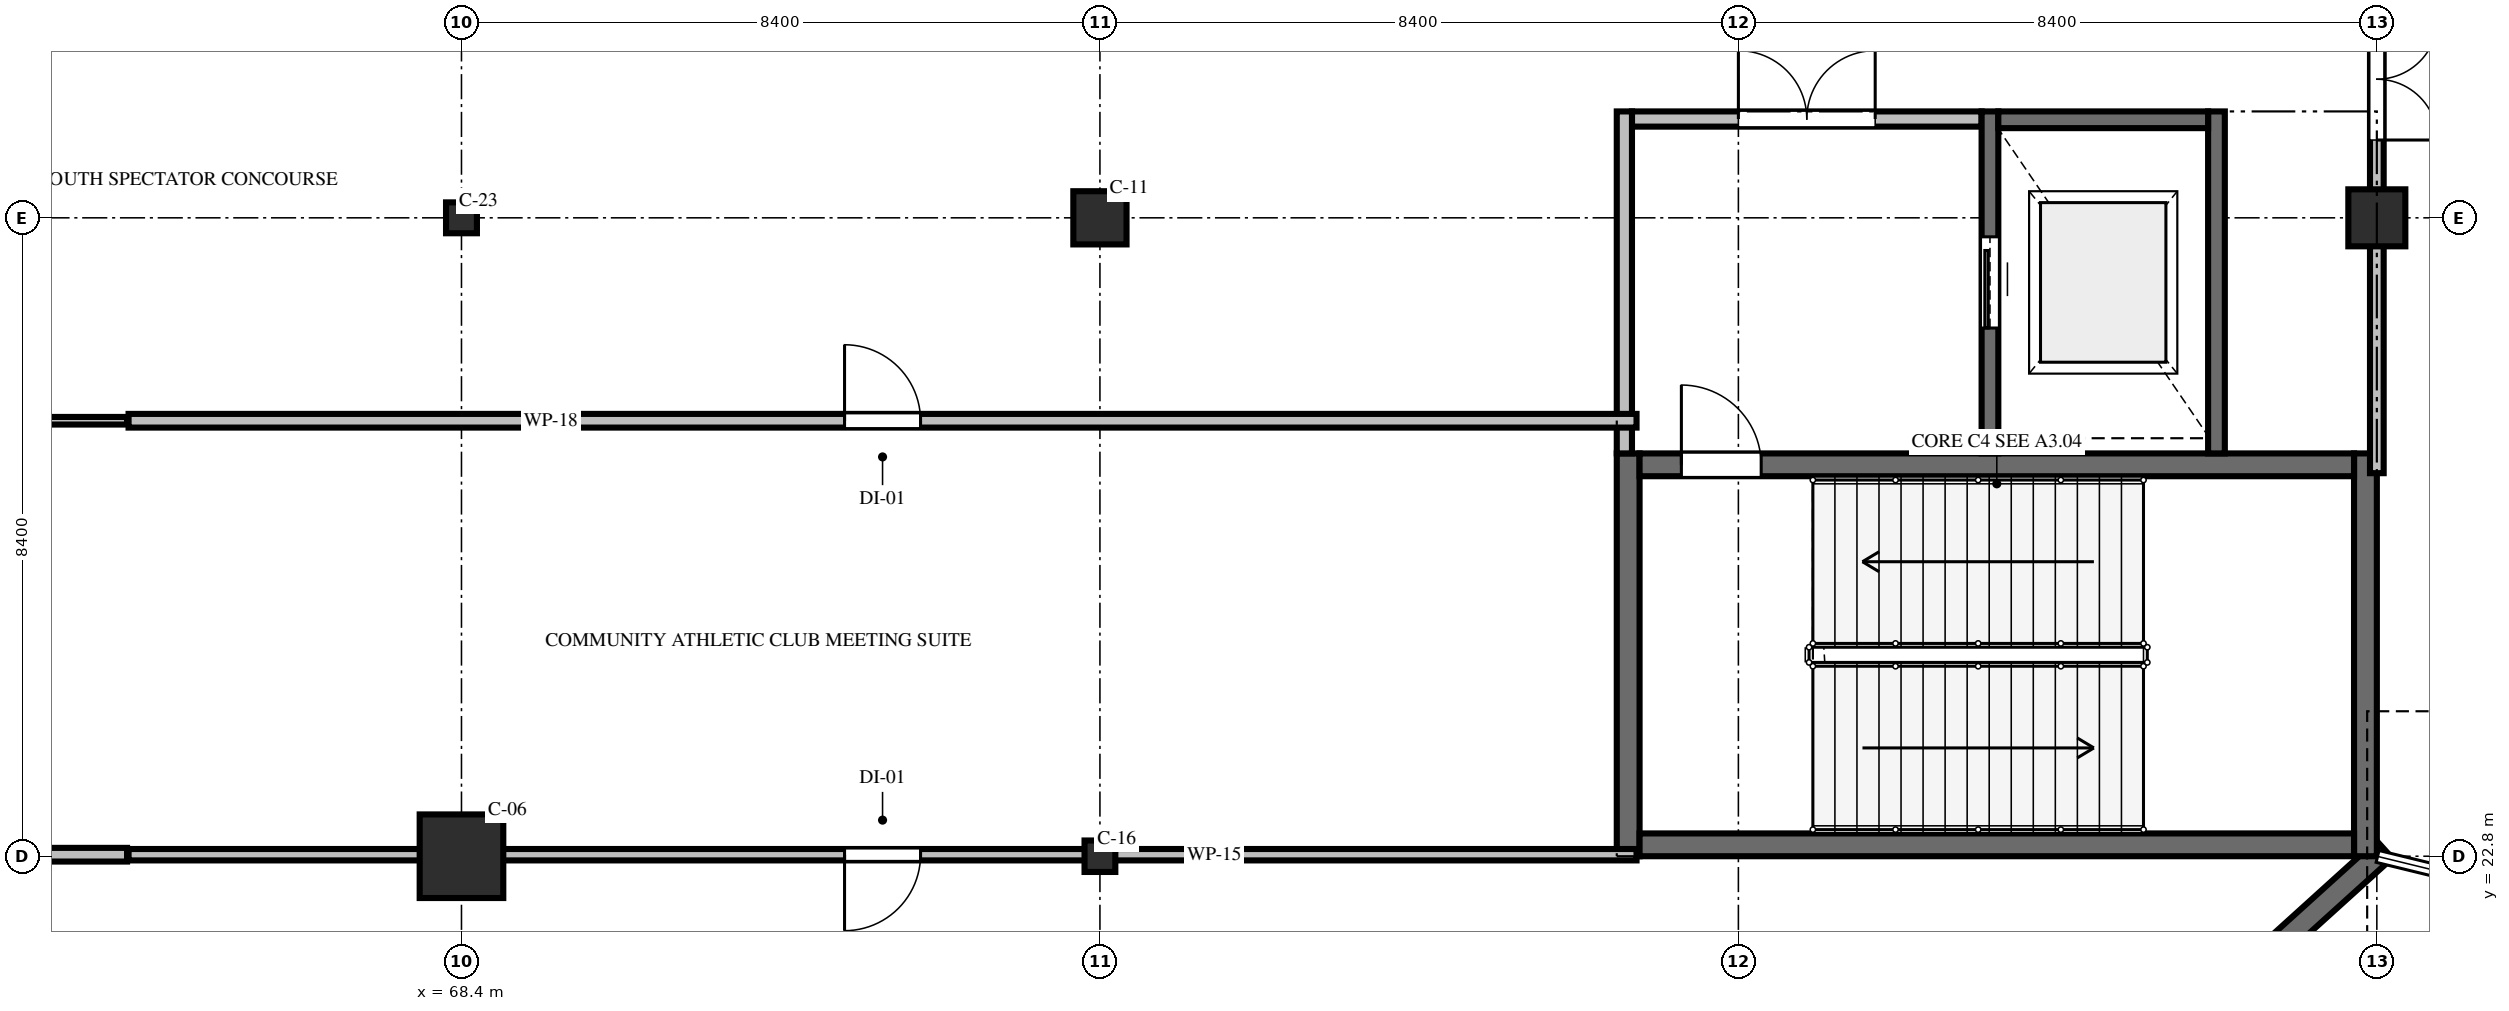
"""IFC4 building model, lengths in metres.
Left out: names, types, materials, properties, quantities, classifications, styles, units other than length and angle.
Written with IfcOpenShell. Run it as: python <this file> out.ifc"""

import sys

from ifc_helpers import new_model, si_unit, direction, frame, frame_2d, origin, origin_2d, place, context, subcontext, project, spatial, rectangle, circle, hollow_circle, i_section, extrude, element, fill, save


model = new_model("IFC4")
c1 = context("Model", 3, precision=1e-05, world=origin(), true_north=direction((0.0, 1.0)))
c2 = subcontext(c1, "Body", "Model", "MODEL_VIEW")
j1 = project(units=[si_unit("LENGTHUNIT", "METRE"), si_unit("PLANEANGLEUNIT", "RADIAN")], contexts=[c1])
p1 = place(None, origin())
s1 = spatial("IfcSite", under=j1, at=p1, CompositionType="ELEMENT")
p2 = place(p1, origin())
s2 = spatial("IfcBuilding", under=s1, at=p2, CompositionType="ELEMENT")
p3 = place(p2, frame((0.0, 0.0, 5.4)))
s3 = spatial("IfcBuildingStorey", under=s2, at=p3, CompositionType="ELEMENT", Elevation=5.4)
p4 = place(p3, frame((68.4, 22.8, 0.0), z_axis=(0.0, 0.0, 1.0), x_axis=(1.0, 0.0, 0.0)))
e1 = element("IfcColumn", 1, at=p4, inside=s3, PredefinedType="COLUMN", context=c2, shape_type="SweptSolid", body=[
    extrude(rectangle(XDim=1.1, YDim=1.1, at=origin_2d()), origin(), (0.0, 0.0, 1.0), 5.4),
])
p5 = place(p3, frame((68.4, 31.2, 0.0), z_axis=(0.0, 0.0, 1.0), x_axis=(1.0, 0.0, 0.0)))
e2 = element("IfcColumn", 2, at=p5, inside=s3, PredefinedType="COLUMN", context=c2, shape_type="SweptSolid", body=[
    extrude(hollow_circle(Radius=0.203, WallThickness=0.016, at=origin_2d()), origin(), (0.0, 0.0, 1.0), 5.4),
])
p6 = place(p3, frame((76.8, 22.8, 0.0), z_axis=(0.0, 0.0, 1.0), x_axis=(1.0, 0.0, 0.0)))
e3 = element("IfcColumn", 3, at=p6, inside=s3, PredefinedType="COLUMN", context=c2, shape_type="SweptSolid", body=[
    extrude(i_section(OverallWidth=0.405, OverallDepth=0.414, WebThickness=0.018, FlangeThickness=0.028, FilletRadius=0.022, at=origin_2d()), origin(), (0.0, 0.0, 1.0), 5.4),
])
p7 = place(p3, frame((76.8, 31.2, 0.0), z_axis=(0.0, 0.0, 1.0), x_axis=(1.0, 0.0, 0.0)))
e4 = element("IfcColumn", 4, at=p7, inside=s3, PredefinedType="COLUMN", context=c2, shape_type="SweptSolid", body=[
    extrude(circle(Radius=0.35, at=origin_2d()), origin(), (0.0, 0.0, 1.0), 5.4),
])
p8 = place(p3, frame((93.6, 31.2, 0.0), z_axis=(0.0, 0.0, 1.0), x_axis=(1.0, 0.0, 0.0)))
e5 = element("IfcColumn", 5, at=p8, inside=s3, PredefinedType="COLUMN", context=c2, shape_type="SweptSolid", body=[
    extrude(rectangle(XDim=0.75, YDim=0.75, at=origin_2d()), origin(), (0.0, 0.0, 1.0), 5.4),
])
p9 = place(p3, frame((93.699, 22.89, 0.0), z_axis=(0.0, 0.0, 1.0), x_axis=(-0.741513407769, -0.670938049375, 0.0)))
e6 = element("IfcWall", 6, at=p9, inside=s3, PredefinedType="SOLIDWALL", context=c2, shape_type="SweptSolid", body=[
    extrude(rectangle(XDim=5.947, YDim=0.31, at=frame_2d((2.973, 0.0))), origin(), (0.0, 0.0, 1.0), 5.09),
])
p10 = place(p9, frame((2.58, 0.0, 0.9)))
e7 = element("IfcOpeningElement", 7, at=p10, cuts=e6, PredefinedType="OPENING", context=c2, shape_type="SweptSolid", body=[
    extrude(rectangle(XDim=1.5, YDim=1.6, at=frame_2d((0.75, 0.8))), frame((0.0, 0.165, 0.0), z_axis=(0.0, -1.0, 0.0), x_axis=(1.0, 0.0, 0.0)), (0.0, 0.0, 1.0), 0.33),
])
for number, where, z_axis, x_axis in (
    (8, (83.75, 22.8, 0.0), (0.0, 0.0, 1.0), (0.0, 1.0, 0.0)),
    (9, (93.45, 28.1, 0.0), (0.0, 0.0, 1.0), (0.0, -1.0, 0.0)),
):
    element("IfcWall", number, at=place(p3, frame(where, z_axis=z_axis, x_axis=x_axis)), inside=s3, PredefinedType="SHEAR", context=c2, shape_type="SweptSolid", body=[
        extrude(rectangle(XDim=5.3, YDim=0.3, at=frame_2d((2.65, 0.0))), origin(), (0.0, 0.0, 1.0), 4.98),
    ])
p11 = place(p3, frame((93.3, 22.95, 0.0), z_axis=(0.0, 0.0, 1.0), x_axis=(-1.0, 0.0, 0.0)))
e10 = element("IfcWall", 10, at=p11, inside=s3, PredefinedType="SHEAR", context=c2, shape_type="SweptSolid", body=[
    extrude(rectangle(XDim=9.4, YDim=0.3, at=frame_2d((4.7, 0.0))), origin(), (0.0, 0.0, 1.0), 4.98),
])
p12 = place(p3, frame((83.9, 27.95, 0.0), z_axis=(0.0, 0.0, 1.0), x_axis=(1.0, 0.0, 0.0)))
e11 = element("IfcWall", 11, at=p12, inside=s3, PredefinedType="SHEAR", context=c2, shape_type="SweptSolid", body=[
    extrude(rectangle(XDim=9.4, YDim=0.3, at=frame_2d((4.7, 0.0))), origin(), (0.0, 0.0, 1.0), 4.98),
])
p13 = place(p12, frame((0.55, 0.0, 0.0)))
e12 = element("IfcOpeningElement", 12, at=p13, cuts=e11, PredefinedType="OPENING", context=c2, shape_type="SweptSolid", body=[
    extrude(rectangle(XDim=1.05, YDim=2.2, at=frame_2d((0.525, 1.1))), frame((0.0, 0.16, 0.0), z_axis=(0.0, -1.0, 0.0), x_axis=(1.0, 0.0, 0.0)), (0.0, 0.0, 1.0), 0.32),
])
p14 = place(p3, frame((83.8, 32.5, 0.0), z_axis=(0.0, 0.0, 1.0), x_axis=(1.0, 0.0, 0.0)))
e13 = element("IfcWall", 13, at=p14, inside=s3, PredefinedType="SOLIDWALL", context=c2, shape_type="SweptSolid", body=[
    extrude(rectangle(XDim=4.6, YDim=0.2, at=frame_2d((2.3, 0.0))), origin(), (0.0, 0.0, 1.0), 4.98),
])
p15 = place(p14, frame((1.4, 0.0, 0.0)))
e14 = element("IfcOpeningElement", 14, at=p15, cuts=e13, PredefinedType="OPENING", context=c2, shape_type="SweptSolid", body=[
    extrude(rectangle(XDim=1.8, YDim=2.2, at=frame_2d((0.9, 1.1))), frame((0.0, 0.11, 0.0), z_axis=(0.0, -1.0, 0.0), x_axis=(1.0, 0.0, 0.0)), (0.0, 0.0, 1.0), 0.22),
])
p16 = place(p3, frame((83.7, 28.1, 0.0), z_axis=(0.0, 0.0, 1.0), x_axis=(0.0, 1.0, 0.0)))
e15 = element("IfcWall", 15, at=p16, inside=s3, PredefinedType="SOLIDWALL", context=c2, shape_type="SweptSolid", body=[
    extrude(rectangle(XDim=4.5, YDim=0.2, at=frame_2d((2.25, 0.0))), origin(), (0.0, 0.0, 1.0), 4.98),
])
p17 = place(p3, frame((88.51, 28.1, 0.0), z_axis=(0.0, 0.0, 1.0), x_axis=(0.0, 1.0, 0.0)))
e16 = element("IfcWall", 16, at=p17, inside=s3, PredefinedType="SOLIDWALL", context=c2, shape_type="SweptSolid", body=[
    extrude(rectangle(XDim=4.5, YDim=0.22, at=frame_2d((2.25, 0.0))), origin(), (0.0, 0.0, 1.0), 4.98),
])
p18 = place(p17, frame((1.65, 0.0, 0.0)))
e17 = element("IfcOpeningElement", 17, at=p18, cuts=e16, PredefinedType="OPENING", context=c2, shape_type="SweptSolid", body=[
    extrude(rectangle(XDim=1.2, YDim=2.2, at=frame_2d((0.6, 1.1))), frame((0.0, 0.12, 0.0), z_axis=(0.0, -1.0, 0.0), x_axis=(1.0, 0.0, 0.0)), (0.0, 0.0, 1.0), 0.24),
])
p19 = place(p3, frame((91.49, 28.1, 0.0), z_axis=(0.0, 0.0, 1.0), x_axis=(0.0, 1.0, 0.0)))
e18 = element("IfcWall", 18, at=p19, inside=s3, PredefinedType="SOLIDWALL", context=c2, shape_type="SweptSolid", body=[
    extrude(rectangle(XDim=4.5, YDim=0.22, at=frame_2d((2.25, 0.0))), origin(), (0.0, 0.0, 1.0), 4.98),
])
p20 = place(p3, frame((88.62, 32.49, 0.0), z_axis=(0.0, 0.0, 1.0), x_axis=(1.0, 0.0, 0.0)))
e19 = element("IfcWall", 19, at=p20, inside=s3, PredefinedType="SOLIDWALL", context=c2, shape_type="SweptSolid", body=[
    extrude(rectangle(XDim=2.76, YDim=0.22, at=frame_2d((1.38, 0.0))), origin(), (0.0, 0.0, 1.0), 4.98),
])
p21 = place(p3, frame((64.0, 22.82, 0.0), z_axis=(0.0, 0.0, 1.0), x_axis=(-1.0, 0.0, 0.0)))
e20 = element("IfcWall", 20, at=p21, inside=s3, PredefinedType="PARTITIONING", context=c2, shape_type="SweptSolid", body=[
    extrude(rectangle(XDim=19.52, YDim=0.18, at=frame_2d((9.76, 0.0))), origin(), (0.0, 0.0, 1.0), 4.12),
])
p22 = place(p21, frame((8.96, 0.0, 0.0)))
e21 = element("IfcOpeningElement", 21, at=p22, cuts=e20, PredefinedType="OPENING", context=c2, shape_type="SweptSolid", body=[
    extrude(rectangle(XDim=1.6, YDim=2.2, at=frame_2d((0.8, 1.1))), frame((0.0, 0.1, 0.0), z_axis=(0.0, -1.0, 0.0), x_axis=(1.0, 0.0, 0.0)), (0.0, 0.0, 1.0), 0.2),
])
p23 = place(p3, frame((44.54, 28.53, 0.0), z_axis=(0.0, 0.0, 1.0), x_axis=(1.0, 0.0, 0.0)))
e22 = element("IfcWall", 22, at=p23, inside=s3, PredefinedType="PARTITIONING", context=c2, shape_type="SweptSolid", body=[
    extrude(rectangle(XDim=19.46, YDim=0.1, at=frame_2d((9.73, 0.0))), origin(), (0.0, 0.0, 1.0), 4.17),
])
p24 = place(p23, frame((8.93, 0.0, 0.0)))
e23 = element("IfcOpeningElement", 23, at=p24, cuts=e22, PredefinedType="OPENING", context=c2, shape_type="SweptSolid", body=[
    extrude(rectangle(XDim=1.6, YDim=2.2, at=frame_2d((0.8, 1.1))), frame((0.0, 0.06, 0.0), z_axis=(0.0, -1.0, 0.0), x_axis=(1.0, 0.0, 0.0)), (0.0, 0.0, 1.0), 0.12),
])
p25 = place(p3, frame((83.86, 22.82, 0.0), z_axis=(0.0, 0.0, 1.0), x_axis=(-1.0, 0.0, 0.0)))
e24 = element("IfcWall", 24, at=p25, inside=s3, PredefinedType="PARTITIONING", context=c2, shape_type="SweptSolid", body=[
    extrude(rectangle(XDim=19.84, YDim=0.15, at=frame_2d((9.92, 0.0))), origin(), (0.0, 0.0, 1.0), 4.178),
])
p26 = place(p25, frame((9.42, 0.0, 0.0)))
e25 = element("IfcOpeningElement", 25, at=p26, cuts=e24, PredefinedType="OPENING", context=c2, shape_type="SweptSolid", body=[
    extrude(rectangle(XDim=1.0, YDim=2.15, at=frame_2d((0.5, 1.075))), frame((0.0, 0.085, 0.0), z_axis=(0.0, -1.0, 0.0), x_axis=(1.0, 0.0, 0.0)), (0.0, 0.0, 1.0), 0.17),
])
p27 = place(p3, frame((64.02, 28.53, 0.0), z_axis=(0.0, 0.0, 1.0), x_axis=(1.0, 0.0, 0.0)))
e26 = element("IfcWall", 26, at=p27, inside=s3, PredefinedType="PARTITIONING", context=c2, shape_type="SweptSolid", body=[
    extrude(rectangle(XDim=19.84, YDim=0.18, at=frame_2d((9.92, 0.0))), origin(), (0.0, 0.0, 1.0), 4.178),
])
p28 = place(p27, frame((9.42, 0.0, 0.0)))
e27 = element("IfcOpeningElement", 27, at=p28, cuts=e26, PredefinedType="OPENING", context=c2, shape_type="SweptSolid", body=[
    extrude(rectangle(XDim=1.0, YDim=2.15, at=frame_2d((0.5, 1.075))), frame((0.0, 0.1, 0.0), z_axis=(0.0, -1.0, 0.0), x_axis=(1.0, 0.0, 0.0)), (0.0, 0.0, 1.0), 0.2),
])
p29 = place(p3, frame((93.6, 51.654, 0.0), z_axis=(0.0, 0.0, 1.0), x_axis=(0.0, -1.0, 0.0)))
e28 = element("IfcWall", 28, at=p29, inside=s3, PredefinedType="PARTITIONING", context=c2, shape_type="SweptSolid", body=[
    extrude(rectangle(XDim=23.814, YDim=0.18, at=frame_2d((11.907, 0.0))), origin(), (0.0, 0.0, 1.0), 3.17),
])
p30 = place(p29, frame((17.83, 0.0, 0.0)))
e29 = element("IfcOpeningElement", 29, at=p30, cuts=e28, PredefinedType="OPENING", context=c2, shape_type="SweptSolid", body=[
    extrude(rectangle(XDim=1.6, YDim=2.2, at=frame_2d((0.8, 1.1))), frame((0.0, 0.1, 0.0), z_axis=(0.0, -1.0, 0.0), x_axis=(1.0, 0.0, 0.0)), (0.0, 0.0, 1.0), 0.2),
])
p31 = place(p13, origin())
e30 = element("IfcDoor", 30, at=p31, inside=s3, OperationType="SINGLE_SWING_LEFT", PredefinedType="DOOR", context=c2, shape_type="SweptSolid", body=[
    extrude(rectangle(XDim=1.05, YDim=2.2, at=frame_2d((0.525, 1.1))), frame((0.0, 0.025, 0.0), z_axis=(0.0, -1.0, 0.0), x_axis=(1.0, 0.0, 0.0)), (0.0, 0.0, 1.0), 0.05),
])
fill(e12, e30)
p32 = place(p15, origin())
e31 = element("IfcDoor", 31, at=p32, inside=s3, OperationType="DOUBLE_DOOR_SINGLE_SWING", PredefinedType="DOOR", context=c2, shape_type="SweptSolid", body=[
    extrude(rectangle(XDim=1.8, YDim=2.2, at=frame_2d((0.9, 1.1))), frame((0.0, 0.025, 0.0), z_axis=(0.0, -1.0, 0.0), x_axis=(1.0, 0.0, 0.0)), (0.0, 0.0, 1.0), 0.05),
])
fill(e14, e31)
p33 = place(p18, origin())
e32 = element("IfcDoor", 32, at=p33, inside=s3, OperationType="SLIDING_TO_LEFT", PredefinedType="DOOR", context=c2, shape_type="SweptSolid", body=[
    extrude(rectangle(XDim=1.2, YDim=2.2, at=frame_2d((0.6, 1.1))), frame((0.0, 0.025, 0.0), z_axis=(0.0, -1.0, 0.0), x_axis=(1.0, 0.0, 0.0)), (0.0, 0.0, 1.0), 0.05),
])
fill(e17, e32)
p34 = place(p26, origin())
e33 = element("IfcDoor", 33, at=p34, inside=s3, OperationType="SINGLE_SWING_RIGHT", PredefinedType="DOOR", context=c2, shape_type="SweptSolid", body=[
    extrude(rectangle(XDim=1.0, YDim=2.15, at=frame_2d((0.5, 1.075))), frame((0.0, 0.025, 0.0), z_axis=(0.0, -1.0, 0.0), x_axis=(1.0, 0.0, 0.0)), (0.0, 0.0, 1.0), 0.05),
])
fill(e25, e33)
p35 = place(p28, origin())
e34 = element("IfcDoor", 34, at=p35, inside=s3, OperationType="SINGLE_SWING_LEFT", PredefinedType="DOOR", context=c2, shape_type="SweptSolid", body=[
    extrude(rectangle(XDim=1.0, YDim=2.15, at=frame_2d((0.5, 1.075))), frame((0.0, 0.025, 0.0), z_axis=(0.0, -1.0, 0.0), x_axis=(1.0, 0.0, 0.0)), (0.0, 0.0, 1.0), 0.05),
])
fill(e27, e34)
p36 = place(p30, origin())
e35 = element("IfcDoor", 35, at=p36, inside=s3, OperationType="DOUBLE_DOOR_SINGLE_SWING", PredefinedType="DOOR", context=c2, shape_type="SweptSolid", body=[
    extrude(rectangle(XDim=1.6, YDim=2.2, at=frame_2d((0.8, 1.1))), frame((0.0, 0.025, 0.0), z_axis=(0.0, -1.0, 0.0), x_axis=(1.0, 0.0, 0.0)), (0.0, 0.0, 1.0), 0.05),
])
fill(e29, e35)
save(model, sys.argv[1])
